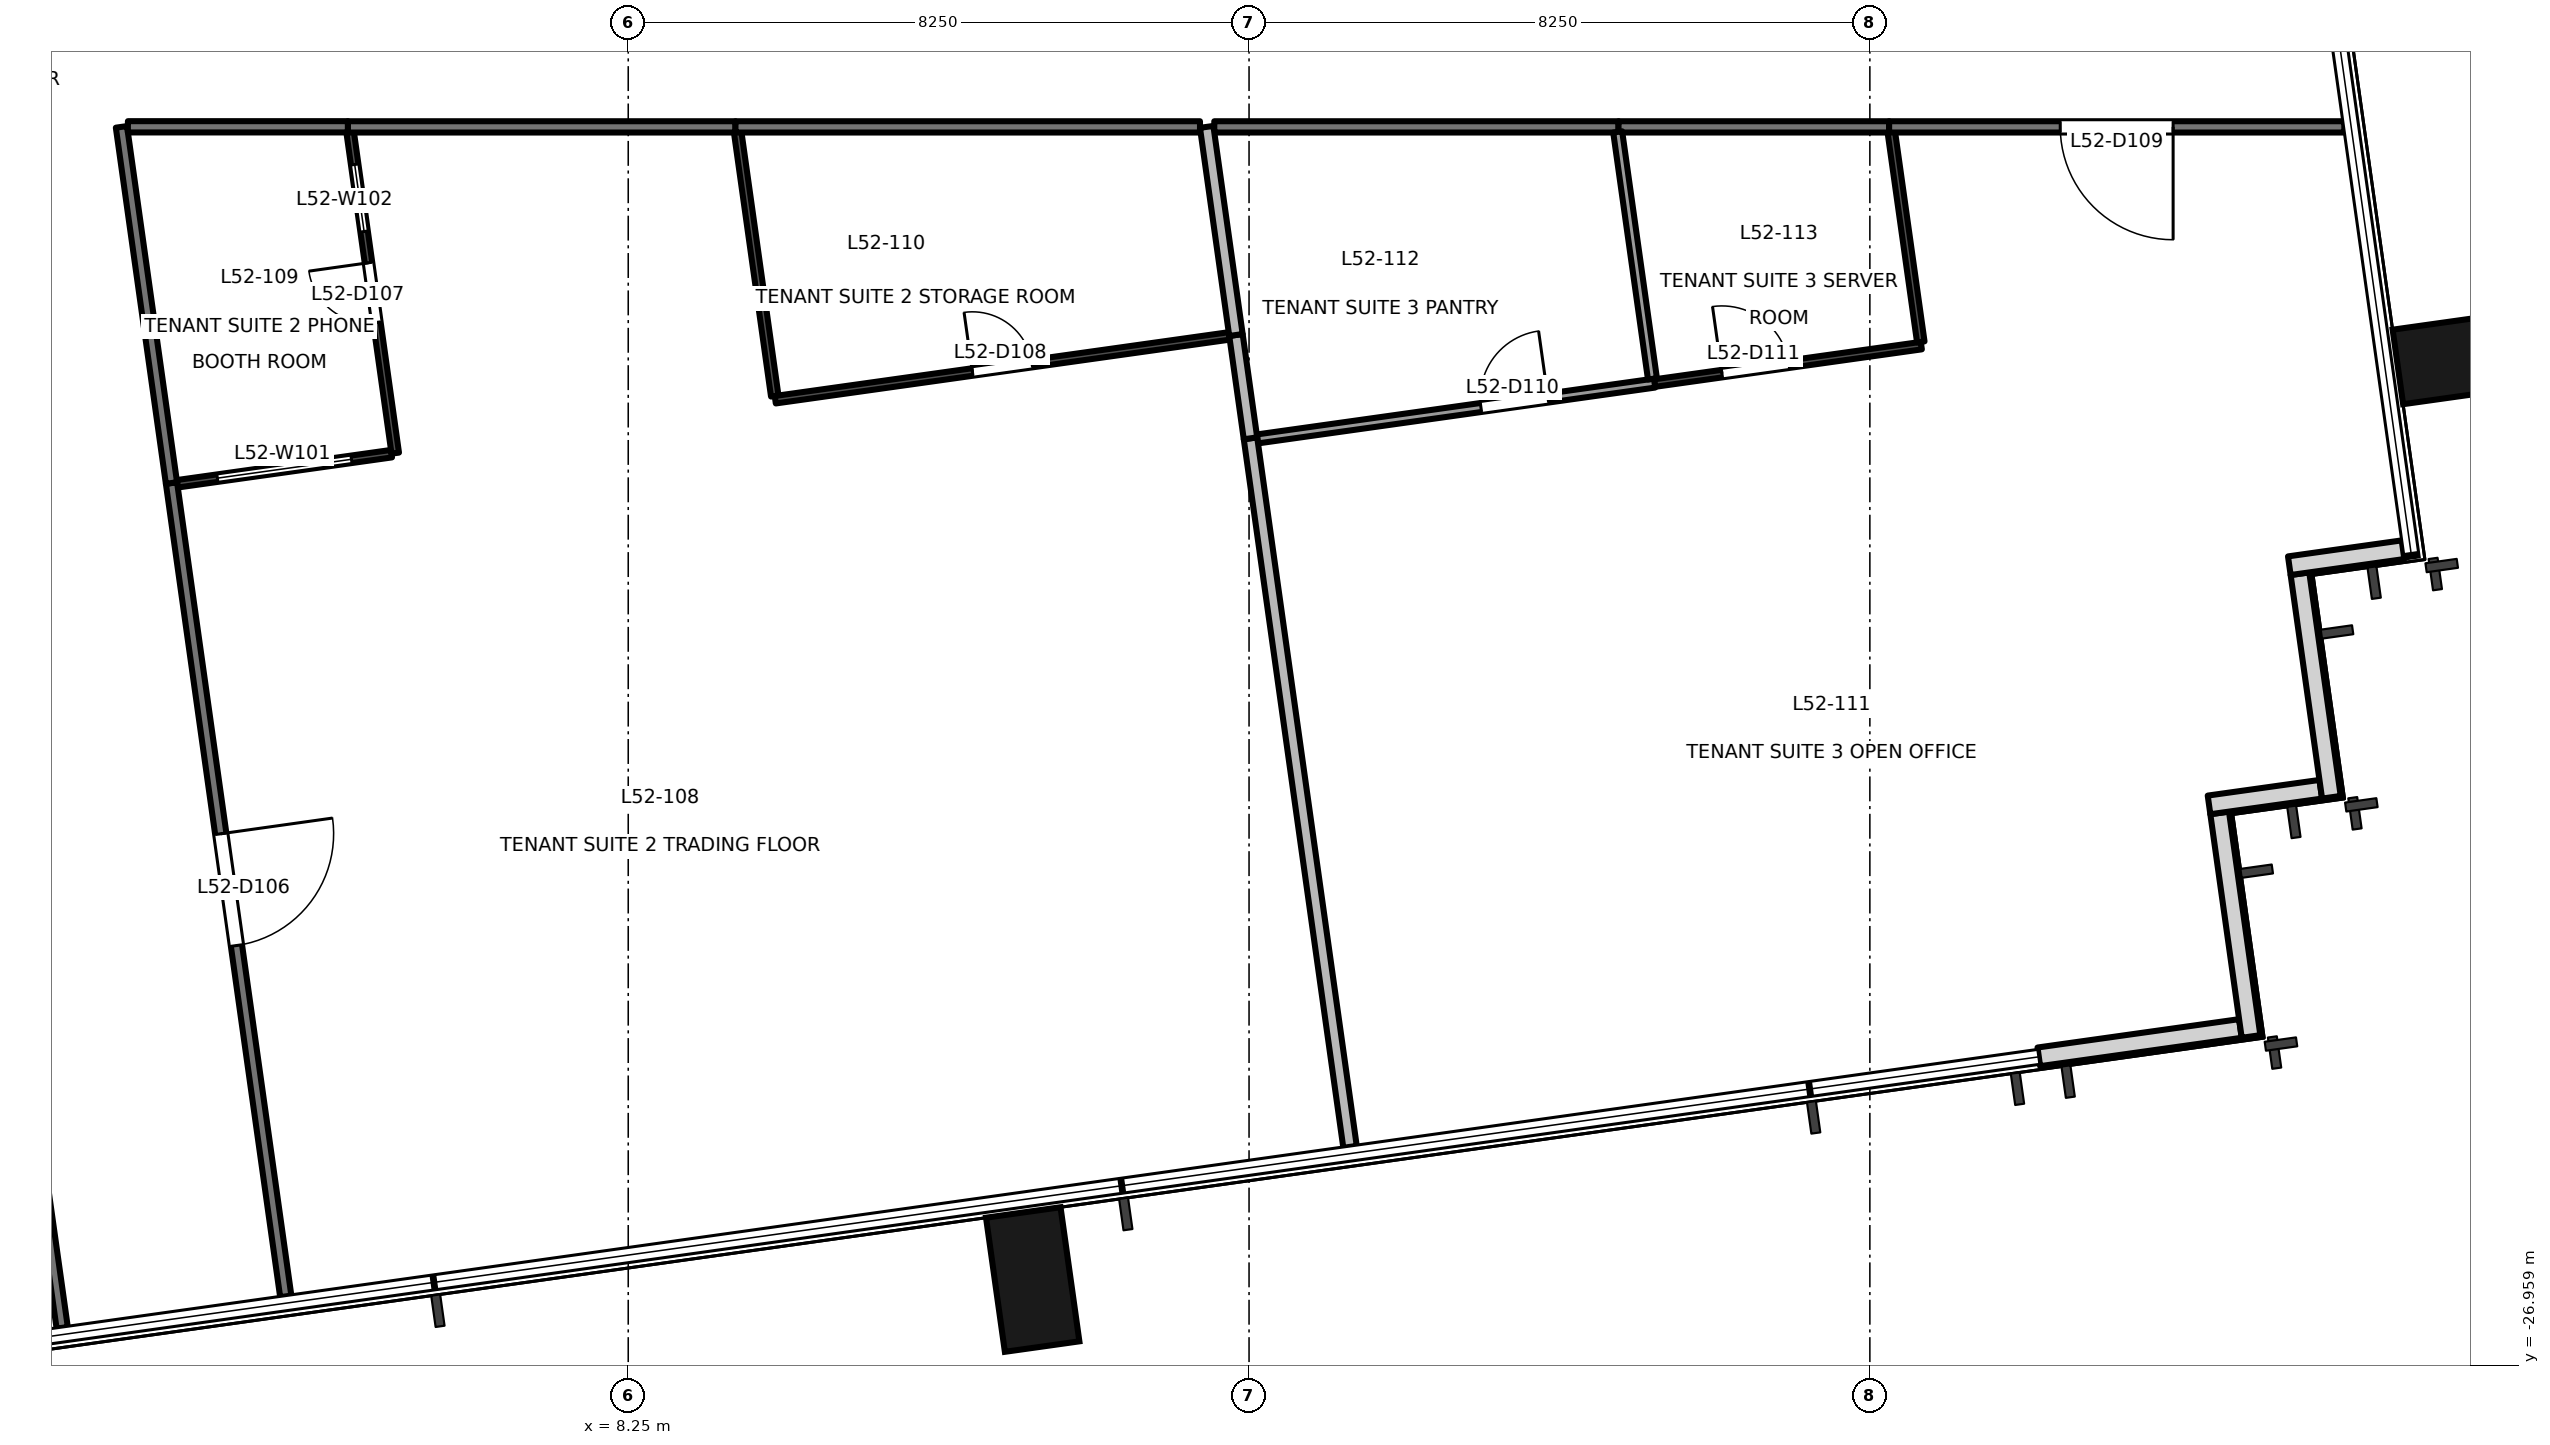
"""IFC4 building model, lengths in metres.
Left out: names, types, materials, properties, quantities, classifications, styles, units other than length and angle.
Written with IfcOpenShell. Run it as: python <this file> out.ifc"""

import sys

from ifc_helpers import new_model, si_unit, direction, frame, frame_2d, origin, origin_2d, place, context, subcontext, project, spatial, rectangle, extrude, element, fill, save


model = new_model("IFC4")
c1 = context("Model", 3, precision=1e-05, world=origin(), true_north=direction((0.0, 1.0)))
c2 = subcontext(c1, "Body", "Model", "MODEL_VIEW")
j1 = project(units=[si_unit("LENGTHUNIT", "METRE"), si_unit("PLANEANGLEUNIT", "RADIAN")], contexts=[c1])
p1 = place(None, origin())
s1 = spatial("IfcSite", under=j1, at=p1, CompositionType="ELEMENT")
p2 = place(p1, origin())
s2 = spatial("IfcBuilding", under=s1, at=p2, CompositionType="ELEMENT")
p3 = place(p2, frame((0.0, 0.0, 229.1)))
s3 = spatial("IfcBuildingStorey", under=s2, at=p3, CompositionType="ELEMENT", Elevation=229.1)
for number, where, z_axis, x_axis in (
    (1, (0.125, -27.716, -0.2), (0.0, 0.0, 1.0), (0.99, 0.139, 0.0)),
    (2, (13.625, -25.818, -0.2), (0.0, 0.0, 1.0), (0.99, 0.139, 0.0)),
    (3, (32.658, -13.565, -0.2), (0.0, 0.0, 1.0), (-0.139, 0.99, 0.0)),
):
    element("IfcColumn", number, at=place(p3, frame(where, z_axis=z_axis, x_axis=x_axis)), inside=s3, PredefinedType="COLUMN", context=c2, shape_type="SweptSolid", body=[
        extrude(rectangle(XDim=1.0, YDim=1.8, at=origin_2d()), origin(), (0.0, 0.0, 1.0), 3.9),
    ])
p4 = place(p3, frame((26.995, -22.859, 0.0), z_axis=(0.0, 0.0, 1.0), x_axis=(0.99024510326, 0.139336411139, 0.0)))
e4 = element("IfcWall", 4, at=p4, inside=s3, PredefinedType="SOLIDWALL", context=c2, shape_type="SweptSolid", body=[
    extrude(rectangle(XDim=2.705, YDim=0.25, at=frame_2d((1.353, 0.0))), origin(), (0.0, 0.0, 1.0), 3.7),
])
p5 = place(p3, frame((29.815, -22.588, 0.0), z_axis=(0.0, 0.0, 1.0), x_axis=(-0.138983028379, 0.9902947631, 0.0)))
e5 = element("IfcWall", 5, at=p5, inside=s3, PredefinedType="SOLIDWALL", context=c2, shape_type="SweptSolid", body=[
    extrude(rectangle(XDim=3.0, YDim=0.25, at=frame_2d((1.5, 0.0))), origin(), (0.0, 0.0, 1.0), 3.7),
])
p6 = place(p3, frame((29.257, -19.51, 0.0), z_axis=(0.0, 0.0, 1.0), x_axis=(0.990330117064, 0.138730887823, 0.0)))
e6 = element("IfcWall", 6, at=p6, inside=s3, PredefinedType="SOLIDWALL", context=c2, shape_type="SweptSolid", body=[
    extrude(rectangle(XDim=1.499, YDim=0.25, at=frame_2d((0.75, 0.0))), origin(), (0.0, 0.0, 1.0), 3.7),
])
p7 = place(p3, frame((30.883, -19.409, 0.0), z_axis=(0.0, 0.0, 1.0), x_axis=(-0.139324658755, 0.990246756855, 0.0)))
e7 = element("IfcWall", 7, at=p7, inside=s3, PredefinedType="SOLIDWALL", context=c2, shape_type="SweptSolid", body=[
    extrude(rectangle(XDim=3.0, YDim=0.25, at=frame_2d((1.5, 0.0))), origin(), (0.0, 0.0, 1.0), 3.7),
])
p8 = place(p3, frame((30.324, -16.332, 0.0), z_axis=(0.0, 0.0, 1.0), x_axis=(0.990238641016, 0.139382329723, 0.0)))
e8 = element("IfcWall", 8, at=p8, inside=s3, PredefinedType="SOLIDWALL", context=c2, shape_type="SweptSolid", body=[
    extrude(rectangle(XDim=1.526, YDim=0.25, at=frame_2d((0.763, 0.0))), origin(), (0.0, 0.0, 1.0), 3.7),
])
p9 = place(p3, frame((0.728, -26.46, 0.0), z_axis=(0.0, 0.0, 1.0), x_axis=(-0.139192487281, 0.990265343978, 0.0)))
e9 = element("IfcWall", 9, at=p9, inside=s3, PredefinedType="PARTITIONING", context=c2, shape_type="SweptSolid", body=[
    extrude(rectangle(XDim=5.46, YDim=0.15, at=frame_2d((2.73, 0.0))), origin(), (0.0, 0.0, 1.0), 2.8),
])
p10 = place(p3, frame((2.18, -15.233, 0.0), z_axis=(0.0, 0.0, 1.0), x_axis=(0.139166413059, -0.990269008642, 0.0)))
e10 = element("IfcWall", 10, at=p10, inside=s3, PredefinedType="PARTITIONING", context=c2, shape_type="SweptSolid", body=[
    extrude(rectangle(XDim=10.915, YDim=0.15, at=frame_2d((5.458, 0.0))), origin(), (0.0, 0.0, 1.0), 3.7),
])
p11 = place(p10, frame((4.707, 0.0, 0.0)))
e11 = element("IfcOpeningElement", 11, at=p11, cuts=e10, PredefinedType="OPENING", context=c2, shape_type="SweptSolid", body=[
    extrude(rectangle(XDim=1.5, YDim=2.1, at=frame_2d((0.75, 1.05))), frame((0.0, 0.085, 0.0), z_axis=(0.0, -1.0, 0.0), x_axis=(1.0, 0.0, 0.0)), (0.0, 0.0, 1.0), 0.171),
])
p12 = place(p3, frame((9.675, -10.5, 0.0), z_axis=(0.0, 0.0, 1.0), x_axis=(-1.0, 0.0, 0.0)))
e12 = element("IfcWall", 12, at=p12, inside=s3, PredefinedType="PARTITIONING", context=c2, shape_type="SweptSolid", body=[
    extrude(rectangle(XDim=5.151, YDim=0.15, at=frame_2d((2.576, 0.0))), origin(), (0.0, 0.0, 1.0), 2.8),
])
p13 = place(p3, frame((1.515, -10.5, 0.0), z_axis=(0.0, 0.0, 1.0), x_axis=(0.139146821365, -0.990271761742, 0.0)))
e13 = element("IfcWall", 13, at=p13, inside=s3, PredefinedType="PARTITIONING", context=c2, shape_type="SweptSolid", body=[
    extrude(rectangle(XDim=4.779, YDim=0.15, at=frame_2d((2.39, 0.0))), origin(), (0.0, 0.0, 1.0), 3.7),
])
p14 = place(p3, frame((4.524, -10.499, 0.0), z_axis=(0.0, 0.0, 1.0), x_axis=(-1.0, 0.0, 0.0)))
e14 = element("IfcWall", 14, at=p14, inside=s3, PredefinedType="PARTITIONING", context=c2, shape_type="SweptSolid", body=[
    extrude(rectangle(XDim=2.923, YDim=0.15, at=frame_2d((1.461, 0.0))), origin(), (0.0, 0.0, 1.0), 2.8),
])
p15 = place(p3, frame((15.848, -10.5, 0.0), z_axis=(0.0, 0.0, 1.0), x_axis=(-1.0, 0.0, 0.0)))
e15 = element("IfcWall", 15, at=p15, inside=s3, PredefinedType="PARTITIONING", context=c2, shape_type="SweptSolid", body=[
    extrude(rectangle(XDim=6.173, YDim=0.15, at=frame_2d((3.086, 0.0))), origin(), (0.0, 0.0, 1.0), 2.9),
])
p16 = place(p3, frame((31.055, -10.5, 0.0), z_axis=(0.0, 0.0, 1.0), x_axis=(-1.0, 0.0, 0.0)))
e16 = element("IfcWall", 16, at=p16, inside=s3, PredefinedType="PARTITIONING", context=c2, shape_type="SweptSolid", body=[
    extrude(rectangle(XDim=6.05, YDim=0.15, at=frame_2d((3.025, 0.0))), origin(), (0.0, 0.0, 1.0), 3.7),
])
p17 = place(p16, frame((2.275, 0.0, 0.0)))
e17 = element("IfcOpeningElement", 17, at=p17, cuts=e16, PredefinedType="OPENING", context=c2, shape_type="SweptSolid", body=[
    extrude(rectangle(XDim=1.5, YDim=2.1, at=frame_2d((0.75, 1.05))), frame((0.0, 0.085, 0.0), z_axis=(0.0, -1.0, 0.0), x_axis=(1.0, 0.0, 0.0)), (0.0, 0.0, 1.0), 0.171),
])
p18 = place(p3, frame((21.41, -10.5, 0.0), z_axis=(0.0, 0.0, 1.0), x_axis=(-1.0, 0.0, 0.0)))
e18 = element("IfcWall", 18, at=p18, inside=s3, PredefinedType="PARTITIONING", context=c2, shape_type="SweptSolid", body=[
    extrude(rectangle(XDim=5.372, YDim=0.15, at=frame_2d((2.686, 0.0))), origin(), (0.0, 0.0, 1.0), 3.7),
])
p19 = place(p3, frame((25.005, -10.5, 0.0), z_axis=(0.0, 0.0, 1.0), x_axis=(-1.0, 0.0, 0.0)))
e19 = element("IfcWall", 19, at=p19, inside=s3, PredefinedType="PARTITIONING", context=c2, shape_type="SweptSolid", body=[
    extrude(rectangle(XDim=3.595, YDim=0.15, at=frame_2d((1.797, 0.0))), origin(), (0.0, 0.0, 1.0), 3.7),
])
p20 = place(p3, frame((2.258, -15.243, 0.0), z_axis=(0.0, 0.0, 1.0), x_axis=(0.990271399447, 0.139149399699, 0.0)))
e20 = element("IfcWall", 20, at=p20, inside=s3, PredefinedType="PARTITIONING", context=c2, shape_type="SweptSolid", body=[
    extrude(rectangle(XDim=2.874, YDim=0.1, at=frame_2d((1.437, 0.0))), origin(), (0.0, 0.0, 1.0), 2.8),
])
p21 = place(p20, frame((0.537, 0.0, 0.9)))
e21 = element("IfcOpeningElement", 21, at=p21, cuts=e20, PredefinedType="OPENING", context=c2, shape_type="SweptSolid", body=[
    extrude(rectangle(XDim=1.8, YDim=1.2, at=frame_2d((0.9, 0.6))), frame((0.0, 0.061, 0.0), z_axis=(0.0, -1.0, 0.0), x_axis=(1.0, 0.0, 0.0)), (0.0, 0.0, 1.0), 0.121),
])
p22 = place(p3, frame((5.154, -14.836, 0.0), z_axis=(0.0, 0.0, 1.0), x_axis=(-0.139240076126, 0.990258653686, 0.0)))
e22 = element("IfcWall", 22, at=p22, inside=s3, PredefinedType="PARTITIONING", context=c2, shape_type="SweptSolid", body=[
    extrude(rectangle(XDim=4.31, YDim=0.1, at=frame_2d((2.155, 0.0))), origin(), (0.0, 0.0, 1.0), 2.8),
])
p23 = place(p22, frame((1.755, 0.0, 0.0)))
e23 = element("IfcOpeningElement", 23, at=p23, cuts=e22, PredefinedType="OPENING", context=c2, shape_type="SweptSolid", body=[
    extrude(rectangle(XDim=0.8, YDim=2.1, at=frame_2d((0.4, 1.05))), frame((0.0, 0.061, 0.0), z_axis=(0.0, -1.0, 0.0), x_axis=(1.0, 0.0, 0.0)), (0.0, 0.0, 1.0), 0.121),
])
p24 = place(p22, frame((2.974, 0.0, 0.9)))
e24 = element("IfcOpeningElement", 24, at=p24, cuts=e22, PredefinedType="OPENING", context=c2, shape_type="SweptSolid", body=[
    extrude(rectangle(XDim=0.9, YDim=1.2, at=frame_2d((0.45, 0.6))), frame((0.0, 0.061, 0.0), z_axis=(0.0, -1.0, 0.0), x_axis=(1.0, 0.0, 0.0)), (0.0, 0.0, 1.0), 0.121),
])
p25 = place(p3, frame((9.704, -10.568, 0.0), z_axis=(0.0, 0.0, 1.0), x_axis=(0.139115473097, -0.9902761661, 0.0)))
e25 = element("IfcWall", 25, at=p25, inside=s3, PredefinedType="PARTITIONING", context=c2, shape_type="SweptSolid", body=[
    extrude(rectangle(XDim=3.543, YDim=0.1, at=frame_2d((1.771, 0.0))), origin(), (0.0, 0.0, 1.0), 3.7),
])
p26 = place(p3, frame((10.204, -14.126, 0.0), z_axis=(0.0, 0.0, 1.0), x_axis=(0.99026754166, 0.139176851288, 0.0)))
e26 = element("IfcWall", 26, at=p26, inside=s3, PredefinedType="PARTITIONING", context=c2, shape_type="SweptSolid", body=[
    extrude(rectangle(XDim=6.092, YDim=0.1, at=frame_2d((3.046, 0.0))), origin(), (0.0, 0.0, 1.0), 2.9),
])
p27 = place(p26, frame((2.646, 0.0, 0.0)))
e27 = element("IfcOpeningElement", 27, at=p27, cuts=e26, PredefinedType="OPENING", context=c2, shape_type="SweptSolid", body=[
    extrude(rectangle(XDim=0.8, YDim=2.1, at=frame_2d((0.4, 1.05))), frame((0.0, 0.061, 0.0), z_axis=(0.0, -1.0, 0.0), x_axis=(1.0, 0.0, 0.0)), (0.0, 0.0, 1.0), 0.121),
])
p28 = place(p3, frame((16.519, -14.639, 0.0), z_axis=(0.0, 0.0, 1.0), x_axis=(0.139138381639, -0.990272947603, 0.0)))
e28 = element("IfcWall", 28, at=p28, inside=s3, PredefinedType="PARTITIONING", context=c2, shape_type="SweptSolid", body=[
    extrude(rectangle(XDim=9.509, YDim=0.18, at=frame_2d((4.754, 0.0))), origin(), (0.0, 0.0, 1.0), 3.7),
])
p29 = place(p3, frame((16.326, -13.266, 0.0), z_axis=(0.0, 0.0, 1.0), x_axis=(0.13930070257, -0.990250127121, 0.0)))
e29 = element("IfcWall", 29, at=p29, inside=s3, PredefinedType="PARTITIONING", context=c2, shape_type="SweptSolid", body=[
    extrude(rectangle(XDim=1.386, YDim=0.18, at=frame_2d((0.693, 0.0))), origin(), (0.0, 0.0, 1.0), 3.7),
])
p30 = place(p3, frame((15.937, -10.5, 0.0), z_axis=(0.0, 0.0, 1.0), x_axis=(0.139230726348, -0.990259968312, 0.0)))
e30 = element("IfcWall", 30, at=p30, inside=s3, PredefinedType="PARTITIONING", context=c2, shape_type="SweptSolid", body=[
    extrude(rectangle(XDim=2.793, YDim=0.18, at=frame_2d((1.396, 0.0))), origin(), (0.0, 0.0, 1.0), 3.7),
])
p31 = place(p3, frame((16.611, -14.647, 0.0), z_axis=(0.0, 0.0, 1.0), x_axis=(0.990263091894, 0.139208508477, 0.0)))
e31 = element("IfcWall", 31, at=p31, inside=s3, PredefinedType="PARTITIONING", context=c2, shape_type="SweptSolid", body=[
    extrude(rectangle(XDim=5.33, YDim=0.12, at=frame_2d((2.665, 0.0))), origin(), (0.0, 0.0, 1.0), 3.7),
])
p32 = place(p31, frame((3.0, 0.0, 0.0)))
e32 = element("IfcOpeningElement", 32, at=p32, cuts=e31, PredefinedType="OPENING", context=c2, shape_type="SweptSolid", body=[
    extrude(rectangle(XDim=0.9, YDim=2.1, at=frame_2d((0.45, 1.05))), frame((0.0, 0.071, 0.0), z_axis=(0.0, -1.0, 0.0), x_axis=(1.0, 0.0, 0.0)), (0.0, 0.0, 1.0), 0.141),
])
p33 = place(p3, frame((21.889, -13.905, 0.0), z_axis=(0.0, 0.0, 1.0), x_axis=(0.990275524816, 0.139120037919, 0.0)))
e33 = element("IfcWall", 33, at=p33, inside=s3, PredefinedType="PARTITIONING", context=c2, shape_type="SweptSolid", body=[
    extrude(rectangle(XDim=3.58, YDim=0.1, at=frame_2d((1.79, 0.0))), origin(), (0.0, 0.0, 1.0), 3.7),
])
p34 = place(p33, frame((0.904, 0.0, 0.0)))
e34 = element("IfcOpeningElement", 34, at=p34, cuts=e33, PredefinedType="OPENING", context=c2, shape_type="SweptSolid", body=[
    extrude(rectangle(XDim=0.9, YDim=2.1, at=frame_2d((0.45, 1.05))), frame((0.0, 0.061, 0.0), z_axis=(0.0, -1.0, 0.0), x_axis=(1.0, 0.0, 0.0)), (0.0, 0.0, 1.0), 0.121),
])
p35 = place(p3, frame((25.427, -13.358, 0.0), z_axis=(0.0, 0.0, 1.0), x_axis=(-0.139176490191, 0.99026759241, 0.0)))
e35 = element("IfcWall", 35, at=p35, inside=s3, PredefinedType="PARTITIONING", context=c2, shape_type="SweptSolid", body=[
    extrude(rectangle(XDim=2.817, YDim=0.1, at=frame_2d((1.409, 0.0))), origin(), (0.0, 0.0, 1.0), 3.7),
])
p36 = place(p3, frame((21.399, -10.567, 0.0), z_axis=(0.0, 0.0, 1.0), x_axis=(0.139430884239, -0.990231805448, 0.0)))
e36 = element("IfcWall", 36, at=p36, inside=s3, PredefinedType="PARTITIONING", context=c2, shape_type="SweptSolid", body=[
    extrude(rectangle(XDim=3.315, YDim=0.12, at=frame_2d((1.657, 0.0))), origin(), (0.0, 0.0, 1.0), 3.7),
])
p37 = place(p11, origin())
e37 = element("IfcDoor", 37, at=p37, inside=s3, OperationType="DOUBLE_DOOR_SINGLE_SWING", PredefinedType="DOOR", context=c2, shape_type="SweptSolid", body=[
    extrude(rectangle(XDim=1.5, YDim=2.1, at=frame_2d((0.75, 1.05))), frame((0.0, 0.025, 0.0), z_axis=(0.0, -1.0, 0.0), x_axis=(1.0, 0.0, 0.0)), (0.0, 0.0, 1.0), 0.05),
])
fill(e11, e37)
p38 = place(p23, origin())
e38 = element("IfcDoor", 38, at=p38, inside=s3, OperationType="SINGLE_SWING_RIGHT", PredefinedType="DOOR", context=c2, shape_type="SweptSolid", body=[
    extrude(rectangle(XDim=0.8, YDim=2.1, at=frame_2d((0.4, 1.05))), frame((0.0, 0.025, 0.0), z_axis=(0.0, -1.0, 0.0), x_axis=(1.0, 0.0, 0.0)), (0.0, 0.0, 1.0), 0.05),
])
fill(e23, e38)
p39 = place(p27, origin())
e39 = element("IfcDoor", 39, at=p39, inside=s3, OperationType="SINGLE_SWING_LEFT", PredefinedType="DOOR", context=c2, shape_type="SweptSolid", body=[
    extrude(rectangle(XDim=0.8, YDim=2.1, at=frame_2d((0.4, 1.05))), frame((0.0, 0.025, 0.0), z_axis=(0.0, -1.0, 0.0), x_axis=(1.0, 0.0, 0.0)), (0.0, 0.0, 1.0), 0.05),
])
fill(e27, e39)
p40 = place(p17, origin())
e40 = element("IfcDoor", 40, at=p40, inside=s3, OperationType="DOUBLE_DOOR_SINGLE_SWING", PredefinedType="DOOR", context=c2, shape_type="SweptSolid", body=[
    extrude(rectangle(XDim=1.5, YDim=2.1, at=frame_2d((0.75, 1.05))), frame((0.0, 0.025, 0.0), z_axis=(0.0, -1.0, 0.0), x_axis=(1.0, 0.0, 0.0)), (0.0, 0.0, 1.0), 0.05),
])
fill(e17, e40)
p41 = place(p32, origin())
e41 = element("IfcDoor", 41, at=p41, inside=s3, OperationType="SINGLE_SWING_RIGHT", PredefinedType="DOOR", context=c2, shape_type="SweptSolid", body=[
    extrude(rectangle(XDim=0.9, YDim=2.1, at=frame_2d((0.45, 1.05))), frame((0.0, 0.025, 0.0), z_axis=(0.0, -1.0, 0.0), x_axis=(1.0, 0.0, 0.0)), (0.0, 0.0, 1.0), 0.05),
])
fill(e32, e41)
p42 = place(p34, origin())
e42 = element("IfcDoor", 42, at=p42, inside=s3, OperationType="SINGLE_SWING_LEFT", PredefinedType="DOOR", context=c2, shape_type="SweptSolid", body=[
    extrude(rectangle(XDim=0.9, YDim=2.1, at=frame_2d((0.45, 1.05))), frame((0.0, 0.025, 0.0), z_axis=(0.0, -1.0, 0.0), x_axis=(1.0, 0.0, 0.0)), (0.0, 0.0, 1.0), 0.05),
])
fill(e34, e42)
p43 = place(p21, origin())
e43 = element("IfcWindow", 43, at=p43, inside=s3, PartitioningType="SINGLE_PANEL", PredefinedType="WINDOW", context=c2, shape_type="SweptSolid", body=[
    extrude(rectangle(XDim=1.8, YDim=1.2, at=frame_2d((0.9, 0.6))), frame((0.0, 0.03, 0.0), z_axis=(0.0, -1.0, 0.0), x_axis=(1.0, 0.0, 0.0)), (0.0, 0.0, 1.0), 0.06),
])
fill(e21, e43)
p44 = place(p24, origin())
e44 = element("IfcWindow", 44, at=p44, inside=s3, PartitioningType="SINGLE_PANEL", PredefinedType="WINDOW", context=c2, shape_type="SweptSolid", body=[
    extrude(rectangle(XDim=0.9, YDim=1.2, at=frame_2d((0.45, 0.6))), frame((0.0, 0.03, 0.0), z_axis=(0.0, -1.0, 0.0), x_axis=(1.0, 0.0, 0.0)), (0.0, 0.0, 1.0), 0.06),
])
fill(e24, e44)
save(model, sys.argv[1])
